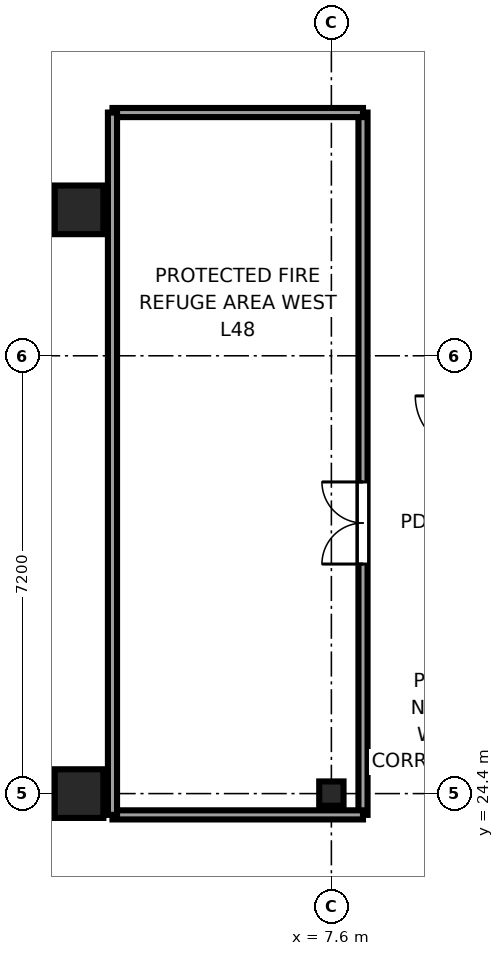
"""IFC4 building model, lengths in metres.
Left out: names, types, materials, properties, quantities, classifications, styles, units other than length and angle.
Written with IfcOpenShell. Run it as: python <this file> out.ifc"""

import sys

from ifc_helpers import new_model, si_unit, direction, frame, frame_2d, origin, origin_2d, place, context, subcontext, project, spatial, rectangle, i_section, extrude, source, transform, mapped, element, fill, save


model = new_model("IFC4")
c1 = context("Model", 3, precision=1e-05, world=origin(), true_north=direction((0.0, 1.0)))
c2 = subcontext(c1, "Body", "Model", "MODEL_VIEW")
j1 = project(units=[si_unit("LENGTHUNIT", "METRE"), si_unit("PLANEANGLEUNIT", "RADIAN")], contexts=[c1])
p1 = place(None, origin())
s1 = spatial("IfcSite", under=j1, at=p1, CompositionType="ELEMENT")
p2 = place(p1, origin())
s2 = spatial("IfcBuilding", under=s1, at=p2, CompositionType="ELEMENT")
p3 = place(p2, frame((0.0, 0.0, 182.55)))
s3 = spatial("IfcBuildingStorey", under=s2, at=p3, CompositionType="ELEMENT", Elevation=182.55)
m1 = source(origin(), c2, "Body", "SweptSolid", [
    extrude(rectangle(XDim=0.8, YDim=0.8, at=origin_2d()), origin(), (0.0, 0.0, 1.0), 5.0),
])
p4 = place(p3, frame((3.45, 24.4, 0.0), z_axis=(0.0, 0.0, 1.0), x_axis=(1.0, 0.0, 0.0)))
e1 = element("IfcColumn", 1, at=p4, inside=s3, PredefinedType="COLUMN", context=c2, shape_type="MappedRepresentation", body=[
    mapped(m1, transform((0.0, 0.0, 0.0), x_axis=(1.0, 0.0, 0.0), y_axis=(0.0, 1.0, 0.0), z_axis=(0.0, 0.0, 1.0), scale=1.0)),
])
m2 = source(origin(), c2, "Body", "SweptSolid", [
    extrude(i_section(OverallWidth=0.4, OverallDepth=0.4, WebThickness=0.02, FlangeThickness=0.035, at=origin_2d()), origin(), (0.0, 0.0, 1.0), 5.0),
])
p5 = place(p3, frame((7.6, 24.4, 0.0), z_axis=(0.0, 0.0, 1.0), x_axis=(1.0, 0.0, 0.0)))
e2 = element("IfcColumn", 2, at=p5, inside=s3, PredefinedType="COLUMN", context=c2, shape_type="MappedRepresentation", body=[
    mapped(m2, transform((0.0, 0.0, 0.0), x_axis=(1.0, 0.0, 0.0), y_axis=(0.0, 1.0, 0.0), z_axis=(0.0, 0.0, 1.0), scale=1.0)),
])
p6 = place(p3, frame((3.45, 34.0, 0.0), z_axis=(0.0, 0.0, 1.0), x_axis=(1.0, 0.0, 0.0)))
e3 = element("IfcColumn", 3, at=p6, inside=s3, PredefinedType="COLUMN", context=c2, shape_type="MappedRepresentation", body=[
    mapped(m1, transform((0.0, 0.0, 0.0), x_axis=(1.0, 0.0, 0.0), y_axis=(0.0, 1.0, 0.0), z_axis=(0.0, 0.0, 1.0), scale=1.0)),
])
p7 = place(p3, frame((8.12, 24.05, 0.0), z_axis=(0.0, 0.0, 1.0), x_axis=(0.0, 1.0, 0.0)))
e4 = element("IfcWall", 4, at=p7, inside=s3, PredefinedType="PARTITIONING", context=c2, shape_type="SweptSolid", body=[
    extrude(rectangle(XDim=11.55, YDim=0.15, at=frame_2d((5.775, 0.0))), origin(), (0.0, 0.0, 1.0), 4.82),
])
p8 = place(p7, frame((4.125, 0.0, 0.0)))
e5 = element("IfcOpeningElement", 5, at=p8, cuts=e4, PredefinedType="OPENING", context=c2, shape_type="SweptSolid", body=[
    extrude(rectangle(XDim=1.35, YDim=2.15, at=frame_2d((0.675, 1.075))), frame((0.0, 0.085, 0.0), z_axis=(0.0, -1.0, 0.0), x_axis=(1.0, 0.0, 0.0)), (0.0, 0.0, 1.0), 0.17),
])
for number, where, z_axis, x_axis in (
    (6, (4.0, 24.05, 0.0), (0.0, 0.0, 1.0), (1.0, 0.0, 0.0)),
    (7, (4.0, 35.6, 0.0), (0.0, 0.0, 1.0), (1.0, 0.0, 0.0)),
):
    element("IfcWall", number, at=place(p3, frame(where, z_axis=z_axis, x_axis=x_axis)), inside=s3, PredefinedType="PARTITIONING", context=c2, shape_type="SweptSolid", body=[
        extrude(rectangle(XDim=4.12, YDim=0.15, at=frame_2d((2.06, 0.0))), origin(), (0.0, 0.0, 1.0), 4.82),
    ])
p9 = place(p3, frame((4.0, 24.05, 0.0), z_axis=(0.0, 0.0, 1.0), x_axis=(0.0, 1.0, 0.0)))
e8 = element("IfcWall", 8, at=p9, inside=s3, PredefinedType="PARTITIONING", context=c2, shape_type="SweptSolid", body=[
    extrude(rectangle(XDim=11.55, YDim=0.15, at=frame_2d((5.775, 0.0))), origin(), (0.0, 0.0, 1.0), 4.282),
])
m3 = source(origin(), c2, "Body", "SweptSolid", [
    extrude(rectangle(XDim=1.35, YDim=2.15, at=frame_2d((0.675, 1.075))), frame((0.0, 0.025, 0.0), z_axis=(0.0, -1.0, 0.0), x_axis=(1.0, 0.0, 0.0)), (0.0, 0.0, 1.0), 0.05),
])
p10 = place(p8, origin())
e9 = element("IfcDoor", 9, at=p10, inside=s3, OperationType="DOUBLE_DOOR_SINGLE_SWING", PredefinedType="DOOR", context=c2, shape_type="MappedRepresentation", body=[
    mapped(m3, transform((0.0, 0.0, 0.0), x_axis=(1.0, 0.0, 0.0), y_axis=(0.0, 1.0, 0.0), z_axis=(0.0, 0.0, 1.0), scale=1.0)),
])
fill(e5, e9)
save(model, sys.argv[1])
